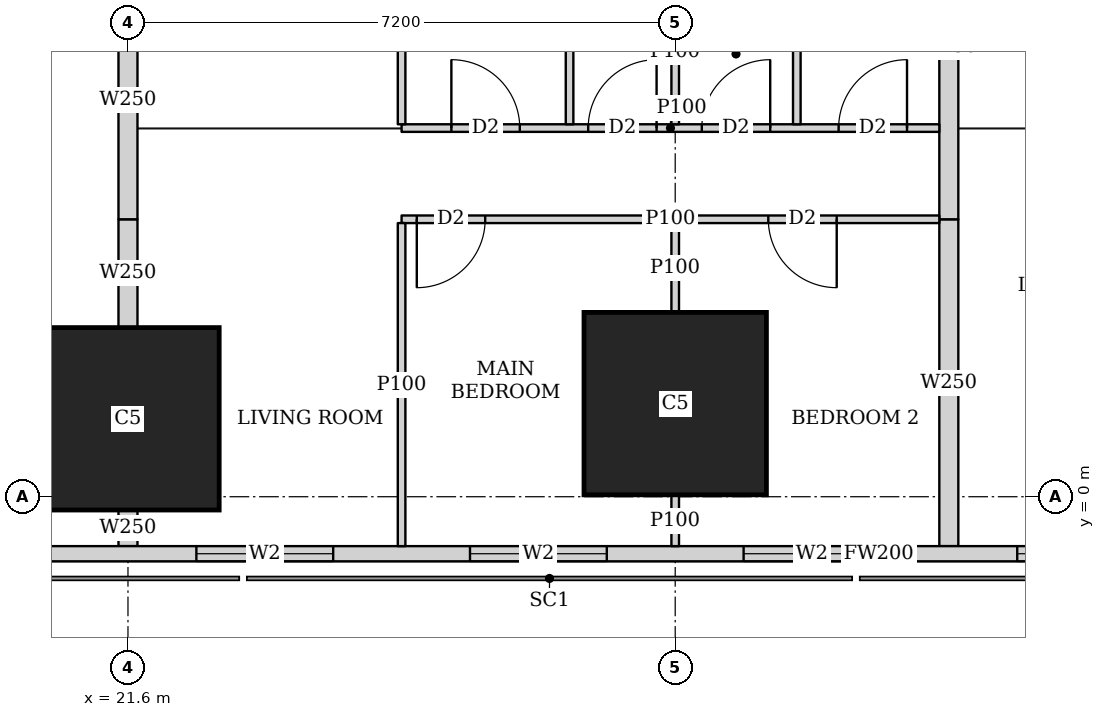
"""IFC4 building model, lengths in metres.
Left out: names, types, materials, properties, quantities, classifications, styles, units other than length and angle.
Written with IfcOpenShell. Run it as: python <this file> out.ifc"""

import sys

from ifc_helpers import new_model, si_unit, direction, frame, frame_2d, origin, origin_2d, place, context, subcontext, project, spatial, rectangle, extrude, element, fill, save


model = new_model("IFC4")
c1 = context("Model", 3, precision=1e-05, world=origin(), true_north=direction((0.0, 1.0)))
c2 = subcontext(c1, "Body", "Model", "MODEL_VIEW")
j1 = project(units=[si_unit("LENGTHUNIT", "METRE"), si_unit("PLANEANGLEUNIT", "RADIAN")], contexts=[c1])
p1 = place(None, origin())
s1 = spatial("IfcSite", under=j1, at=p1, CompositionType="ELEMENT")
p2 = place(p1, origin())
s2 = spatial("IfcBuilding", under=s1, at=p2, CompositionType="ELEMENT")
p3 = place(p2, frame((0.0, 0.0, 234.95)))
s3 = spatial("IfcBuildingStorey", under=s2, at=p3, CompositionType="ELEMENT", Elevation=234.95)
for number, where, z_axis, x_axis in (
    (1, (21.6, 1.025, 0.0), (0.0, 0.0, 1.0), (1.0, 0.0, 0.0)),
    (2, (28.8, 1.225, 0.0), (0.0, 0.0, 1.0), (1.0, 0.0, 0.0)),
):
    element("IfcColumn", number, at=place(p3, frame(where, z_axis=z_axis, x_axis=x_axis)), inside=s3, PredefinedType="COLUMN", context=c2, shape_type="SweptSolid", body=[
        extrude(rectangle(XDim=2.4, YDim=2.4, at=origin_2d()), origin(), (0.0, 0.0, 1.0), 3.75),
    ])
p4 = place(p3, frame((14.563, -0.75, 0.0), z_axis=(0.0, 0.0, 1.0), x_axis=(1.0, 0.0, 0.0)))
e3 = element("IfcWall", 3, at=p4, inside=s3, PredefinedType="SOLIDWALL", context=c2, shape_type="SweptSolid", body=[
    extrude(rectangle(XDim=33.228, YDim=0.2, at=frame_2d((16.614, 0.0))), origin(), (0.0, 0.0, 1.0), 3.5),
])
p5 = place(p4, frame((2.319, 0.0, 0.9)))
e4 = element("IfcOpeningElement", 4, at=p5, cuts=e3, PredefinedType="OPENING", context=c2, shape_type="SweptSolid", body=[
    extrude(rectangle(XDim=2.4, YDim=1.5, at=frame_2d((1.2, 0.75))), frame((0.0, 0.11, 0.0), z_axis=(0.0, -1.0, 0.0), x_axis=(1.0, 0.0, 0.0)), (0.0, 0.0, 1.0), 0.22),
])
p6 = place(p4, frame((7.937, 0.0, 0.9)))
e5 = element("IfcOpeningElement", 5, at=p6, cuts=e3, PredefinedType="OPENING", context=c2, shape_type="SweptSolid", body=[
    extrude(rectangle(XDim=1.8, YDim=1.5, at=frame_2d((0.9, 0.75))), frame((0.0, 0.11, 0.0), z_axis=(0.0, -1.0, 0.0), x_axis=(1.0, 0.0, 0.0)), (0.0, 0.0, 1.0), 0.22),
])
p7 = place(p4, frame((11.537, 0.0, 0.9)))
e6 = element("IfcOpeningElement", 6, at=p7, cuts=e3, PredefinedType="OPENING", context=c2, shape_type="SweptSolid", body=[
    extrude(rectangle(XDim=1.8, YDim=1.5, at=frame_2d((0.9, 0.75))), frame((0.0, 0.11, 0.0), z_axis=(0.0, -1.0, 0.0), x_axis=(1.0, 0.0, 0.0)), (0.0, 0.0, 1.0), 0.22),
])
p8 = place(p4, frame((15.137, 0.0, 0.9)))
e7 = element("IfcOpeningElement", 7, at=p8, cuts=e3, PredefinedType="OPENING", context=c2, shape_type="SweptSolid", body=[
    extrude(rectangle(XDim=1.8, YDim=1.5, at=frame_2d((0.9, 0.75))), frame((0.0, 0.11, 0.0), z_axis=(0.0, -1.0, 0.0), x_axis=(1.0, 0.0, 0.0)), (0.0, 0.0, 1.0), 0.22),
])
p9 = place(p4, frame((18.737, 0.0, 0.9)))
e8 = element("IfcOpeningElement", 8, at=p9, cuts=e3, PredefinedType="OPENING", context=c2, shape_type="SweptSolid", body=[
    extrude(rectangle(XDim=1.8, YDim=1.5, at=frame_2d((0.9, 0.75))), frame((0.0, 0.11, 0.0), z_axis=(0.0, -1.0, 0.0), x_axis=(1.0, 0.0, 0.0)), (0.0, 0.0, 1.0), 0.22),
])
p10 = place(p4, frame((22.337, 0.0, 0.9)))
e9 = element("IfcOpeningElement", 9, at=p10, cuts=e3, PredefinedType="OPENING", context=c2, shape_type="SweptSolid", body=[
    extrude(rectangle(XDim=1.8, YDim=1.5, at=frame_2d((0.9, 0.75))), frame((0.0, 0.11, 0.0), z_axis=(0.0, -1.0, 0.0), x_axis=(1.0, 0.0, 0.0)), (0.0, 0.0, 1.0), 0.22),
])
p11 = place(p4, frame((25.937, 0.0, 0.9)))
e10 = element("IfcOpeningElement", 10, at=p11, cuts=e3, PredefinedType="OPENING", context=c2, shape_type="SweptSolid", body=[
    extrude(rectangle(XDim=1.8, YDim=1.5, at=frame_2d((0.9, 0.75))), frame((0.0, 0.11, 0.0), z_axis=(0.0, -1.0, 0.0), x_axis=(1.0, 0.0, 0.0)), (0.0, 0.0, 1.0), 0.22),
])
p12 = place(p3, frame((32.275, 3.65, 0.0), z_axis=(0.0, 0.0, 1.0), x_axis=(-1.0, 0.0, 0.0)))
e11 = element("IfcWall", 11, at=p12, inside=s3, PredefinedType="PARTITIONING", context=c2, shape_type="SweptSolid", body=[
    extrude(rectangle(XDim=7.075, YDim=0.1, at=frame_2d((3.538, 0.0))), origin(), (0.0, 0.0, 1.0), 3.5),
])
p13 = place(p12, frame((5.975, 0.0, 0.0)))
e12 = element("IfcOpeningElement", 12, at=p13, cuts=e11, PredefinedType="OPENING", context=c2, shape_type="SweptSolid", body=[
    extrude(rectangle(XDim=0.9, YDim=2.1, at=frame_2d((0.45, 1.05))), frame((0.0, 0.06, 0.0), z_axis=(0.0, -1.0, 0.0), x_axis=(1.0, 0.0, 0.0)), (0.0, 0.0, 1.0), 0.12),
])
p14 = place(p12, frame((1.35, 0.0, 0.0)))
e13 = element("IfcOpeningElement", 13, at=p14, cuts=e11, PredefinedType="OPENING", context=c2, shape_type="SweptSolid", body=[
    extrude(rectangle(XDim=0.9, YDim=2.1, at=frame_2d((0.45, 1.05))), frame((0.0, 0.06, 0.0), z_axis=(0.0, -1.0, 0.0), x_axis=(1.0, 0.0, 0.0)), (0.0, 0.0, 1.0), 0.12),
])
p15 = place(p3, frame((32.275, 4.85, 0.0), z_axis=(0.0, 0.0, 1.0), x_axis=(-1.0, 0.0, 0.0)))
e14 = element("IfcWall", 14, at=p15, inside=s3, PredefinedType="PARTITIONING", context=c2, shape_type="SweptSolid", body=[
    extrude(rectangle(XDim=7.075, YDim=0.1, at=frame_2d((3.538, 0.0))), origin(), (0.0, 0.0, 1.0), 3.5),
])
p16 = place(p15, frame((5.52, 0.0, 0.0)))
e15 = element("IfcOpeningElement", 15, at=p16, cuts=e14, PredefinedType="OPENING", context=c2, shape_type="SweptSolid", body=[
    extrude(rectangle(XDim=0.9, YDim=2.1, at=frame_2d((0.45, 1.05))), frame((0.0, 0.06, 0.0), z_axis=(0.0, -1.0, 0.0), x_axis=(1.0, 0.0, 0.0)), (0.0, 0.0, 1.0), 0.12),
])
p17 = place(p15, frame((2.225, 0.0, 0.0)))
e16 = element("IfcOpeningElement", 16, at=p17, cuts=e14, PredefinedType="OPENING", context=c2, shape_type="SweptSolid", body=[
    extrude(rectangle(XDim=0.9, YDim=2.1, at=frame_2d((0.45, 1.05))), frame((0.0, 0.06, 0.0), z_axis=(0.0, -1.0, 0.0), x_axis=(1.0, 0.0, 0.0)), (0.0, 0.0, 1.0), 0.12),
])
p18 = place(p15, frame((3.72, 0.0, 0.0)))
e17 = element("IfcOpeningElement", 17, at=p18, cuts=e14, PredefinedType="OPENING", context=c2, shape_type="SweptSolid", body=[
    extrude(rectangle(XDim=0.9, YDim=2.1, at=frame_2d((0.45, 1.05))), frame((0.0, 0.06, 0.0), z_axis=(0.0, -1.0, 0.0), x_axis=(1.0, 0.0, 0.0)), (0.0, 0.0, 1.0), 0.12),
])
p19 = place(p15, frame((0.425, 0.0, 0.0)))
e18 = element("IfcOpeningElement", 18, at=p19, cuts=e14, PredefinedType="OPENING", context=c2, shape_type="SweptSolid", body=[
    extrude(rectangle(XDim=0.9, YDim=2.1, at=frame_2d((0.45, 1.05))), frame((0.0, 0.06, 0.0), z_axis=(0.0, -1.0, 0.0), x_axis=(1.0, 0.0, 0.0)), (0.0, 0.0, 1.0), 0.12),
])
p20 = place(p3, frame((25.2, -0.65, 0.0), z_axis=(0.0, 0.0, 1.0), x_axis=(0.0, 1.0, 0.0)))
e19 = element("IfcWall", 19, at=p20, inside=s3, PredefinedType="PARTITIONING", context=c2, shape_type="SweptSolid", body=[
    extrude(rectangle(XDim=4.25, YDim=0.1, at=frame_2d((2.125, 0.0))), origin(), (0.0, 0.0, 1.0), 2.05),
])
p21 = place(p3, frame((28.8, -0.65, 0.0), z_axis=(0.0, 0.0, 1.0), x_axis=(0.0, 1.0, 0.0)))
e20 = element("IfcWall", 20, at=p21, inside=s3, PredefinedType="PARTITIONING", context=c2, shape_type="SweptSolid", body=[
    extrude(rectangle(XDim=0.674, YDim=0.1, at=frame_2d((0.337, 0.0))), origin(), (0.0, 0.0, 1.0), 3.5),
])
p22 = place(p3, frame((28.8, 2.426, 0.0), z_axis=(0.0, 0.0, 1.0), x_axis=(0.0, 1.0, 0.0)))
e21 = element("IfcWall", 21, at=p22, inside=s3, PredefinedType="PARTITIONING", context=c2, shape_type="SweptSolid", body=[
    extrude(rectangle(XDim=1.174, YDim=0.1, at=frame_2d((0.587, 0.0))), origin(), (0.0, 0.0, 1.0), 3.5),
])
p23 = place(p3, frame((25.2, 4.9, 0.0), z_axis=(0.0, 0.0, 1.0), x_axis=(0.0, 1.0, 0.0)))
e22 = element("IfcWall", 22, at=p23, inside=s3, PredefinedType="PARTITIONING", context=c2, shape_type="SweptSolid", body=[
    extrude(rectangle(XDim=3.275, YDim=0.1, at=frame_2d((1.638, 0.0))), origin(), (0.0, 0.0, 1.0), 3.5),
])
p24 = place(p3, frame((28.8, 4.9, 0.0), z_axis=(0.0, 0.0, 1.0), x_axis=(0.0, 1.0, 0.0)))
e23 = element("IfcWall", 23, at=p24, inside=s3, PredefinedType="PARTITIONING", context=c2, shape_type="SweptSolid", body=[
    extrude(rectangle(XDim=1.899, YDim=0.1, at=frame_2d((0.95, 0.0))), origin(), (0.0, 0.0, 1.0), 3.5),
])
for number, where, z_axis, x_axis in (
    (24, (27.41, 4.9, 0.0), (0.0, 0.0, 1.0), (0.0, 1.0, 0.0)),
    (25, (30.4, 4.9, 0.0), (0.0, 0.0, 1.0), (0.0, 1.0, 0.0)),
):
    element("IfcWall", number, at=place(p3, frame(where, z_axis=z_axis, x_axis=x_axis)), inside=s3, PredefinedType="PARTITIONING", context=c2, shape_type="SweptSolid", body=[
        extrude(rectangle(XDim=3.275, YDim=0.1, at=frame_2d((1.638, 0.0))), origin(), (0.0, 0.0, 1.0), 3.5),
    ])
p25 = place(p3, frame((21.6, -0.65, 0.0), z_axis=(0.0, 0.0, 1.0), x_axis=(0.0, 1.0, 0.0)))
e26 = element("IfcWall", 26, at=p25, inside=s3, PredefinedType="SOLIDWALL", context=c2, shape_type="SweptSolid", body=[
    extrude(rectangle(XDim=0.474, YDim=0.25, at=frame_2d((0.237, 0.0))), origin(), (0.0, 0.0, 1.0), 2.05),
])
p26 = place(p3, frame((21.6, 2.226, 0.0), z_axis=(0.0, 0.0, 1.0), x_axis=(0.0, 1.0, 0.0)))
e27 = element("IfcWall", 27, at=p26, inside=s3, PredefinedType="SOLIDWALL", context=c2, shape_type="SweptSolid", body=[
    extrude(rectangle(XDim=1.424, YDim=0.25, at=frame_2d((0.712, 0.0))), origin(), (0.0, 0.0, 1.0), 2.05),
])
p27 = place(p3, frame((21.6, 3.65, 0.0), z_axis=(0.0, 0.0, 1.0), x_axis=(0.0, 1.0, 0.0)))
e28 = element("IfcWall", 28, at=p27, inside=s3, PredefinedType="SOLIDWALL", context=c2, shape_type="SweptSolid", body=[
    extrude(rectangle(XDim=3.149, YDim=0.25, at=frame_2d((1.575, 0.0))), origin(), (0.0, 0.0, 1.0), 3.5),
])
p28 = place(p3, frame((32.4, -0.65, 0.0), z_axis=(0.0, 0.0, 1.0), x_axis=(0.0, 1.0, 0.0)))
e29 = element("IfcWall", 29, at=p28, inside=s3, PredefinedType="SOLIDWALL", context=c2, shape_type="SweptSolid", body=[
    extrude(rectangle(XDim=4.3, YDim=0.25, at=frame_2d((2.15, 0.0))), origin(), (0.0, 0.0, 1.0), 2.05),
])
p29 = place(p3, frame((32.4, 3.65, 0.0), z_axis=(0.0, 0.0, 1.0), x_axis=(0.0, 1.0, 0.0)))
e30 = element("IfcWall", 30, at=p29, inside=s3, PredefinedType="SOLIDWALL", context=c2, shape_type="SweptSolid", body=[
    extrude(rectangle(XDim=4.525, YDim=0.25, at=frame_2d((2.263, 0.0))), origin(), (0.0, 0.0, 1.0), 3.5),
])
p30 = place(p6, origin())
e31 = element("IfcWindow", 31, at=p30, inside=s3, PartitioningType="SINGLE_PANEL", PredefinedType="WINDOW", context=c2, shape_type="SweptSolid", body=[
    extrude(rectangle(XDim=1.8, YDim=1.5, at=frame_2d((0.9, 0.75))), frame((0.0, 0.03, 0.0), z_axis=(0.0, -1.0, 0.0), x_axis=(1.0, 0.0, 0.0)), (0.0, 0.0, 1.0), 0.06),
])
fill(e5, e31)
p31 = place(p7, origin())
e32 = element("IfcWindow", 32, at=p31, inside=s3, PartitioningType="SINGLE_PANEL", PredefinedType="WINDOW", context=c2, shape_type="SweptSolid", body=[
    extrude(rectangle(XDim=1.8, YDim=1.5, at=frame_2d((0.9, 0.75))), frame((0.0, 0.03, 0.0), z_axis=(0.0, -1.0, 0.0), x_axis=(1.0, 0.0, 0.0)), (0.0, 0.0, 1.0), 0.06),
])
fill(e6, e32)
p32 = place(p8, origin())
e33 = element("IfcWindow", 33, at=p32, inside=s3, PartitioningType="SINGLE_PANEL", PredefinedType="WINDOW", context=c2, shape_type="SweptSolid", body=[
    extrude(rectangle(XDim=1.8, YDim=1.5, at=frame_2d((0.9, 0.75))), frame((0.0, 0.03, 0.0), z_axis=(0.0, -1.0, 0.0), x_axis=(1.0, 0.0, 0.0)), (0.0, 0.0, 1.0), 0.06),
])
fill(e7, e33)
p33 = place(p9, origin())
e34 = element("IfcWindow", 34, at=p33, inside=s3, PartitioningType="SINGLE_PANEL", PredefinedType="WINDOW", context=c2, shape_type="SweptSolid", body=[
    extrude(rectangle(XDim=1.8, YDim=1.5, at=frame_2d((0.9, 0.75))), frame((0.0, 0.03, 0.0), z_axis=(0.0, -1.0, 0.0), x_axis=(1.0, 0.0, 0.0)), (0.0, 0.0, 1.0), 0.06),
])
fill(e8, e34)
p34 = place(p13, origin())
e35 = element("IfcDoor", 35, at=p34, inside=s3, OperationType="SINGLE_SWING_RIGHT", PredefinedType="DOOR", context=c2, shape_type="SweptSolid", body=[
    extrude(rectangle(XDim=0.9, YDim=2.1, at=frame_2d((0.45, 1.05))), frame((0.0, 0.025, 0.0), z_axis=(0.0, -1.0, 0.0), x_axis=(1.0, 0.0, 0.0)), (0.0, 0.0, 1.0), 0.05),
])
fill(e12, e35)
p35 = place(p14, origin())
e36 = element("IfcDoor", 36, at=p35, inside=s3, OperationType="SINGLE_SWING_LEFT", PredefinedType="DOOR", context=c2, shape_type="SweptSolid", body=[
    extrude(rectangle(XDim=0.9, YDim=2.1, at=frame_2d((0.45, 1.05))), frame((0.0, 0.025, 0.0), z_axis=(0.0, -1.0, 0.0), x_axis=(1.0, 0.0, 0.0)), (0.0, 0.0, 1.0), 0.05),
])
fill(e13, e36)
p36 = place(p16, origin())
e37 = element("IfcDoor", 37, at=p36, inside=s3, OperationType="SINGLE_SWING_LEFT", PredefinedType="DOOR", context=c2, shape_type="SweptSolid", body=[
    extrude(rectangle(XDim=0.9, YDim=2.1, at=frame_2d((0.45, 1.05))), frame((0.0, 0.025, 0.0), z_axis=(0.0, -1.0, 0.0), x_axis=(1.0, 0.0, 0.0)), (0.0, 0.0, 1.0), 0.05),
])
fill(e15, e37)
p37 = place(p17, origin())
e38 = element("IfcDoor", 38, at=p37, inside=s3, OperationType="SINGLE_SWING_RIGHT", PredefinedType="DOOR", context=c2, shape_type="SweptSolid", body=[
    extrude(rectangle(XDim=0.9, YDim=2.1, at=frame_2d((0.45, 1.05))), frame((0.0, 0.025, 0.0), z_axis=(0.0, -1.0, 0.0), x_axis=(1.0, 0.0, 0.0)), (0.0, 0.0, 1.0), 0.05),
])
fill(e16, e38)
p38 = place(p18, origin())
e39 = element("IfcDoor", 39, at=p38, inside=s3, OperationType="SINGLE_SWING_RIGHT", PredefinedType="DOOR", context=c2, shape_type="SweptSolid", body=[
    extrude(rectangle(XDim=0.9, YDim=2.1, at=frame_2d((0.45, 1.05))), frame((0.0, 0.025, 0.0), z_axis=(0.0, -1.0, 0.0), x_axis=(1.0, 0.0, 0.0)), (0.0, 0.0, 1.0), 0.05),
])
fill(e17, e39)
p39 = place(p19, origin())
e40 = element("IfcDoor", 40, at=p39, inside=s3, OperationType="SINGLE_SWING_RIGHT", PredefinedType="DOOR", context=c2, shape_type="SweptSolid", body=[
    extrude(rectangle(XDim=0.9, YDim=2.1, at=frame_2d((0.45, 1.05))), frame((0.0, 0.025, 0.0), z_axis=(0.0, -1.0, 0.0), x_axis=(1.0, 0.0, 0.0)), (0.0, 0.0, 1.0), 0.05),
])
fill(e18, e40)
save(model, sys.argv[1])
